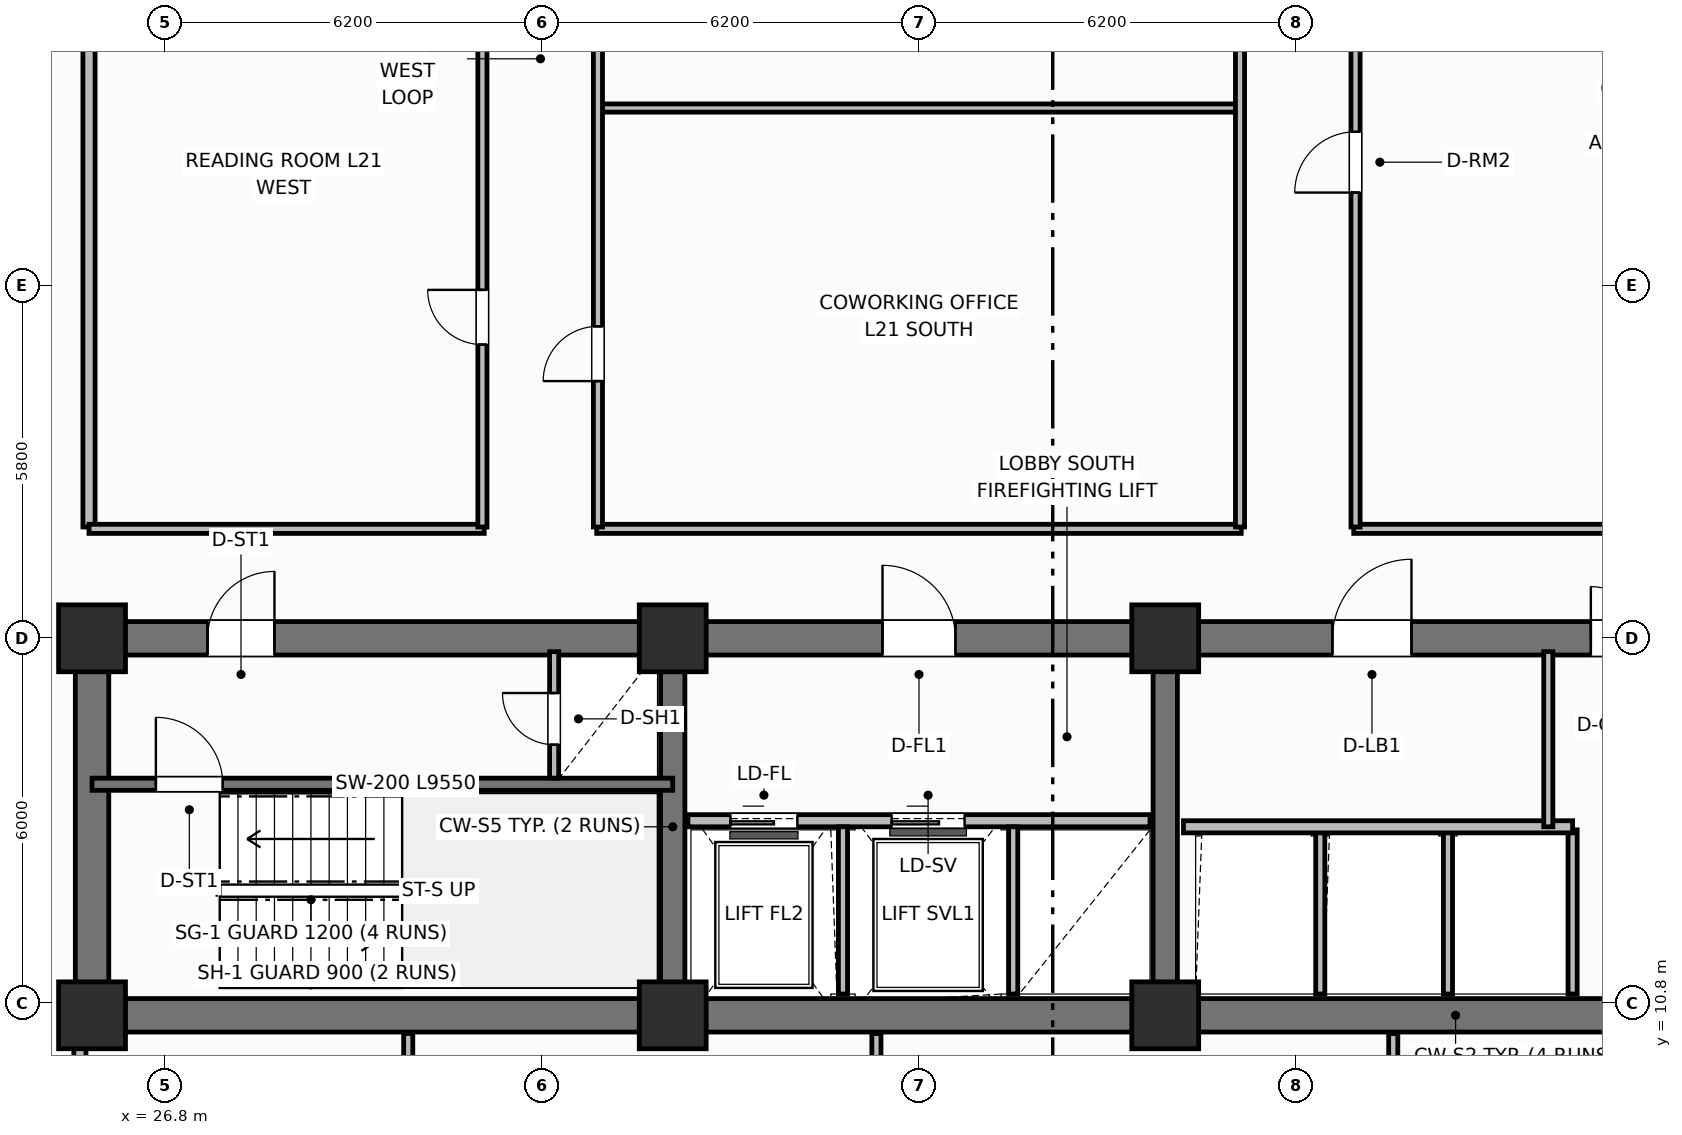
"""IFC4 building model, lengths in metres.
Left out: names, types, materials, properties, quantities, classifications, styles, units other than length and angle.
Written with IfcOpenShell. Run it as: python <this file> out.ifc"""

import sys

from ifc_helpers import new_model, si_unit, direction, frame, frame_2d, origin, origin_2d, place, context, subcontext, project, spatial, rectangle, extrude, element, fill, save


model = new_model("IFC4")
c1 = context("Model", 3, precision=1e-05, world=origin(), true_north=direction((0.0, 1.0)))
c2 = subcontext(c1, "Body", "Model", "MODEL_VIEW")
j1 = project(units=[si_unit("LENGTHUNIT", "METRE"), si_unit("PLANEANGLEUNIT", "RADIAN")], contexts=[c1])
p1 = place(None, origin())
s1 = spatial("IfcSite", under=j1, at=p1, CompositionType="ELEMENT")
p2 = place(p1, origin())
s2 = spatial("IfcBuilding", under=s1, at=p2, CompositionType="ELEMENT")
p3 = place(p2, frame((0.0, 0.0, 88.3)))
s3 = spatial("IfcBuildingStorey", under=s2, at=p3, CompositionType="ELEMENT", Elevation=88.3)
p4 = place(p3, frame((52.8, 10.6, 0.0), z_axis=(0.0, 0.0, 1.0), x_axis=(-1.0, 0.0, 0.0)))
e1 = element("IfcWall", 1, at=p4, inside=s3, PredefinedType="SHEAR", context=c2, shape_type="SweptSolid", body=[
    extrude(rectangle(XDim=27.2, YDim=0.55, at=frame_2d((13.6, 0.0))), origin(), (0.0, 0.0, 1.0), 3.7),
])
p5 = place(p3, frame((25.6, 10.875, 0.0), z_axis=(0.0, 0.0, 1.0), x_axis=(0.0, 1.0, 0.0)))
e2 = element("IfcWall", 2, at=p5, inside=s3, PredefinedType="SHEAR", context=c2, shape_type="SweptSolid", body=[
    extrude(rectangle(XDim=5.65, YDim=0.55, at=frame_2d((2.825, 0.0))), origin(), (0.0, 0.0, 1.0), 3.7),
])
p6 = place(p3, frame((25.6, 16.8, 0.0), z_axis=(0.0, 0.0, 1.0), x_axis=(1.0, 0.0, 0.0)))
e3 = element("IfcWall", 3, at=p6, inside=s3, PredefinedType="SHEAR", context=c2, shape_type="SweptSolid", body=[
    extrude(rectangle(XDim=27.2, YDim=0.55, at=frame_2d((13.6, 0.0))), origin(), (0.0, 0.0, 1.0), 3.7),
])
p7 = place(p6, frame((1.9, 0.0, 0.0)))
e4 = element("IfcOpeningElement", 4, at=p7, cuts=e3, PredefinedType="OPENING", context=c2, shape_type="SweptSolid", body=[
    extrude(rectangle(XDim=1.1, YDim=2.15, at=frame_2d((0.55, 1.075))), frame((0.0, 0.285, 0.0), z_axis=(0.0, -1.0, 0.0), x_axis=(1.0, 0.0, 0.0)), (0.0, 0.0, 1.0), 0.57),
])
p8 = place(p6, frame((13.0, 0.0, 0.0)))
e5 = element("IfcOpeningElement", 5, at=p8, cuts=e3, PredefinedType="OPENING", context=c2, shape_type="SweptSolid", body=[
    extrude(rectangle(XDim=1.2, YDim=2.15, at=frame_2d((0.6, 1.075))), frame((0.0, 0.285, 0.0), z_axis=(0.0, -1.0, 0.0), x_axis=(1.0, 0.0, 0.0)), (0.0, 0.0, 1.0), 0.57),
])
p9 = place(p6, frame((20.4, 0.0, 0.0)))
e6 = element("IfcOpeningElement", 6, at=p9, cuts=e3, PredefinedType="OPENING", context=c2, shape_type="SweptSolid", body=[
    extrude(rectangle(XDim=1.3, YDim=2.2, at=frame_2d((0.65, 1.1))), frame((0.0, 0.285, 0.0), z_axis=(0.0, -1.0, 0.0), x_axis=(1.0, 0.0, 0.0)), (0.0, 0.0, 1.0), 0.57),
])
p10 = place(p6, frame((24.65, 0.0, 0.0)))
e7 = element("IfcOpeningElement", 7, at=p10, cuts=e3, PredefinedType="OPENING", context=c2, shape_type="SweptSolid", body=[
    extrude(rectangle(XDim=0.85, YDim=2.1, at=frame_2d((0.425, 1.05))), frame((0.0, 0.285, 0.0), z_axis=(0.0, -1.0, 0.0), x_axis=(1.0, 0.0, 0.0)), (0.0, 0.0, 1.0), 0.57),
])
for number, where, z_axis, x_axis in (
    (8, (35.15, 10.875, 0.0), (0.0, 0.0, 1.0), (0.0, 1.0, 0.0)),
    (9, (43.25, 10.875, 0.0), (0.0, 0.0, 1.0), (0.0, 1.0, 0.0)),
):
    element("IfcWall", number, at=place(p3, frame(where, z_axis=z_axis, x_axis=x_axis)), inside=s3, PredefinedType="SHEAR", context=c2, shape_type="SweptSolid", body=[
        extrude(rectangle(XDim=5.65, YDim=0.4, at=frame_2d((2.825, 0.0))), origin(), (0.0, 0.0, 1.0), 3.7),
    ])
for number, where, z_axis, x_axis in (
    (10, (25.6, 10.6, 0.0), (0.0, 0.0, 1.0), (1.0, 0.0, 0.0)),
    (11, (25.6, 16.8, 0.0), (0.0, 0.0, 1.0), (1.0, 0.0, 0.0)),
    (12, (35.15, 10.6, 0.0), (0.0, 0.0, 1.0), (1.0, 0.0, 0.0)),
    (13, (35.15, 16.8, 0.0), (0.0, 0.0, 1.0), (1.0, 0.0, 0.0)),
    (14, (43.25, 10.6, 0.0), (0.0, 0.0, 1.0), (1.0, 0.0, 0.0)),
    (15, (43.25, 16.8, 0.0), (0.0, 0.0, 1.0), (1.0, 0.0, 0.0)),
):
    element("IfcColumn", number, at=place(p3, frame(where, z_axis=z_axis, x_axis=x_axis)), inside=s3, PredefinedType="COLUMN", context=c2, shape_type="SweptSolid", body=[
        extrude(rectangle(XDim=1.1, YDim=1.1, at=origin_2d()), origin(), (0.0, 0.0, 1.0), 3.7),
    ])
p11 = place(p3, frame((25.6, 14.4, 0.0), z_axis=(0.0, 0.0, 1.0), x_axis=(1.0, 0.0, 0.0)))
e16 = element("IfcWall", 16, at=p11, inside=s3, PredefinedType="SHEAR", context=c2, shape_type="SweptSolid", body=[
    extrude(rectangle(XDim=9.55, YDim=0.2, at=frame_2d((4.775, 0.0))), origin(), (0.0, 0.0, 1.0), 3.7),
])
p12 = place(p11, frame((1.05, 0.0, 0.0)))
e17 = element("IfcOpeningElement", 17, at=p12, cuts=e16, PredefinedType="OPENING", context=c2, shape_type="SweptSolid", body=[
    extrude(rectangle(XDim=1.1, YDim=2.15, at=frame_2d((0.55, 1.075))), frame((0.0, 0.11, 0.0), z_axis=(0.0, -1.0, 0.0), x_axis=(1.0, 0.0, 0.0)), (0.0, 0.0, 1.0), 0.22),
])
p13 = place(p3, frame((33.2, 14.5, 0.0), z_axis=(0.0, 0.0, 1.0), x_axis=(0.0, 1.0, 0.0)))
e18 = element("IfcWall", 18, at=p13, inside=s3, PredefinedType="PARTITIONING", context=c2, shape_type="SweptSolid", body=[
    extrude(rectangle(XDim=2.08, YDim=0.15, at=frame_2d((1.04, 0.0))), origin(), (0.0, 0.0, 1.0), 2.53),
])
p14 = place(p13, frame((0.55, 0.0, 0.0)))
e19 = element("IfcOpeningElement", 19, at=p14, cuts=e18, PredefinedType="OPENING", context=c2, shape_type="SweptSolid", body=[
    extrude(rectangle(XDim=0.85, YDim=2.05, at=frame_2d((0.425, 1.025))), frame((0.0, 0.085, 0.0), z_axis=(0.0, -1.0, 0.0), x_axis=(1.0, 0.0, 0.0)), (0.0, 0.0, 1.0), 0.17),
])
p15 = place(p3, frame((35.4, 13.8, 0.0), z_axis=(0.0, 0.0, 1.0), x_axis=(1.0, 0.0, 0.0)))
e20 = element("IfcWall", 20, at=p15, inside=s3, PredefinedType="PARTITIONING", context=c2, shape_type="SweptSolid", body=[
    extrude(rectangle(XDim=7.6, YDim=0.2, at=frame_2d((3.8, 0.0))), origin(), (0.0, 0.0, 1.0), 2.3),
])
p16 = place(p15, frame((0.7, 0.0, 0.0)))
e21 = element("IfcOpeningElement", 21, at=p16, cuts=e20, PredefinedType="OPENING", context=c2, shape_type="SweptSolid", body=[
    extrude(rectangle(XDim=1.1, YDim=2.15, at=frame_2d((0.55, 1.075))), frame((0.0, 0.11, 0.0), z_axis=(0.0, -1.0, 0.0), x_axis=(1.0, 0.0, 0.0)), (0.0, 0.0, 1.0), 0.22),
])
p17 = place(p15, frame((3.35, 0.0, 0.0)))
e22 = element("IfcOpeningElement", 22, at=p17, cuts=e20, PredefinedType="OPENING", context=c2, shape_type="SweptSolid", body=[
    extrude(rectangle(XDim=1.2, YDim=2.15, at=frame_2d((0.6, 1.075))), frame((0.0, 0.11, 0.0), z_axis=(0.0, -1.0, 0.0), x_axis=(1.0, 0.0, 0.0)), (0.0, 0.0, 1.0), 0.22),
])
for number, where, z_axis, x_axis in (
    (23, (37.95, 10.95, 0.0), (0.0, 0.0, 1.0), (0.0, 1.0, 0.0)),
    (24, (40.75, 10.95, 0.0), (0.0, 0.0, 1.0), (0.0, 1.0, 0.0)),
):
    element("IfcWall", number, at=place(p3, frame(where, z_axis=z_axis, x_axis=x_axis)), inside=s3, PredefinedType="PARTITIONING", context=c2, shape_type="SweptSolid", body=[
        extrude(rectangle(XDim=2.75, YDim=0.15, at=frame_2d((1.375, 0.0))), origin(), (0.0, 0.0, 1.0), 2.53),
    ])
for number, where, z_axis, x_axis in (
    (25, (45.8, 10.95, 0.0), (0.0, 0.0, 1.0), (0.0, 1.0, 0.0)),
    (26, (47.9, 10.95, 0.0), (0.0, 0.0, 1.0), (0.0, 1.0, 0.0)),
    (27, (49.95, 10.95, 0.0), (0.0, 0.0, 1.0), (0.0, 1.0, 0.0)),
):
    element("IfcWall", number, at=place(p3, frame(where, z_axis=z_axis, x_axis=x_axis)), inside=s3, PredefinedType="PARTITIONING", context=c2, shape_type="SweptSolid", body=[
        extrude(rectangle(XDim=2.7, YDim=0.15, at=frame_2d((1.35, 0.0))), origin(), (0.0, 0.0, 1.0), 2.53),
    ])
p18 = place(p3, frame((43.55, 13.7, 0.0), z_axis=(0.0, 0.0, 1.0), x_axis=(1.0, 0.0, 0.0)))
e28 = element("IfcWall", 28, at=p18, inside=s3, PredefinedType="PARTITIONING", context=c2, shape_type="SweptSolid", body=[
    extrude(rectangle(XDim=6.4, YDim=0.2, at=frame_2d((3.2, 0.0))), origin(), (0.0, 0.0, 1.0), 2.53),
])
p19 = place(p3, frame((49.55, 13.7, 0.0), z_axis=(0.0, 0.0, 1.0), x_axis=(0.0, 1.0, 0.0)))
e29 = element("IfcWall", 29, at=p19, inside=s3, PredefinedType="PARTITIONING", context=c2, shape_type="SweptSolid", body=[
    extrude(rectangle(XDim=2.88, YDim=0.15, at=frame_2d((1.44, 0.0))), origin(), (0.0, 0.0, 1.0), 2.53),
])
p20 = place(p3, frame((25.55, 18.63, 0.0), z_axis=(0.0, 0.0, 1.0), x_axis=(0.0, 1.0, 0.0)))
e30 = element("IfcWall", 30, at=p20, inside=s3, PredefinedType="PARTITIONING", context=c2, shape_type="SweptSolid", body=[
    extrude(rectangle(XDim=19.14, YDim=0.2, at=frame_2d((9.57, 0.0))), origin(), (0.0, 0.0, 1.0), 2.53),
])
p21 = place(p3, frame((25.55, 18.6, 0.0), z_axis=(0.0, 0.0, 1.0), x_axis=(1.0, 0.0, 0.0)))
e31 = element("IfcWall", 31, at=p21, inside=s3, PredefinedType="PARTITIONING", context=c2, shape_type="SweptSolid", body=[
    extrude(rectangle(XDim=6.5, YDim=0.15, at=frame_2d((3.25, 0.0))), origin(), (0.0, 0.0, 1.0), 2.53),
])
p22 = place(p3, frame((33.9, 18.6, 0.0), z_axis=(0.0, 0.0, 1.0), x_axis=(1.0, 0.0, 0.0)))
e32 = element("IfcWall", 32, at=p22, inside=s3, PredefinedType="PARTITIONING", context=c2, shape_type="SweptSolid", body=[
    extrude(rectangle(XDim=10.6, YDim=0.15, at=frame_2d((5.3, 0.0))), origin(), (0.0, 0.0, 1.0), 2.53),
])
p23 = place(p3, frame((46.35, 18.6, 0.0), z_axis=(0.0, 0.0, 1.0), x_axis=(1.0, 0.0, 0.0)))
e33 = element("IfcWall", 33, at=p23, inside=s3, PredefinedType="PARTITIONING", context=c2, shape_type="SweptSolid", body=[
    extrude(rectangle(XDim=6.5, YDim=0.15, at=frame_2d((3.25, 0.0))), origin(), (0.0, 0.0, 1.0), 2.53),
])
p24 = place(p3, frame((33.92, 25.521, 0.0), z_axis=(0.0, 0.0, 1.0), x_axis=(1.0, 0.0, 0.0)))
e34 = element("IfcWall", 34, at=p24, inside=s3, PredefinedType="PARTITIONING", context=c2, shape_type="SweptSolid", body=[
    extrude(rectangle(XDim=10.56, YDim=0.135, at=frame_2d((5.28, 0.0))), origin(), (0.0, 0.0, 1.0), 2.53),
])
p25 = place(p3, frame((32.02, 18.63, 0.0), z_axis=(0.0, 0.0, 1.0), x_axis=(0.0, 1.0, 0.0)))
e35 = element("IfcWall", 35, at=p25, inside=s3, PredefinedType="PARTITIONING", context=c2, shape_type="SweptSolid", body=[
    extrude(rectangle(XDim=19.14, YDim=0.15, at=frame_2d((9.57, 0.0))), origin(), (0.0, 0.0, 1.0), 2.53),
])
p26 = place(p25, frame((3.0, 0.0, 0.0)))
e36 = element("IfcOpeningElement", 36, at=p26, cuts=e35, PredefinedType="OPENING", context=c2, shape_type="SweptSolid", body=[
    extrude(rectangle(XDim=0.9, YDim=2.1, at=frame_2d((0.45, 1.05))), frame((0.0, 0.085, 0.0), z_axis=(0.0, -1.0, 0.0), x_axis=(1.0, 0.0, 0.0)), (0.0, 0.0, 1.0), 0.17),
])
p27 = place(p25, frame((11.5, 0.0, 0.0)))
e37 = element("IfcOpeningElement", 37, at=p27, cuts=e35, PredefinedType="OPENING", context=c2, shape_type="SweptSolid", body=[
    extrude(rectangle(XDim=0.9, YDim=2.1, at=frame_2d((0.45, 1.05))), frame((0.0, 0.085, 0.0), z_axis=(0.0, -1.0, 0.0), x_axis=(1.0, 0.0, 0.0)), (0.0, 0.0, 1.0), 0.17),
])
p28 = place(p3, frame((33.92, 18.63, 0.0), z_axis=(0.0, 0.0, 1.0), x_axis=(0.0, 1.0, 0.0)))
e38 = element("IfcWall", 38, at=p28, inside=s3, PredefinedType="PARTITIONING", context=c2, shape_type="SweptSolid", body=[
    extrude(rectangle(XDim=19.14, YDim=0.15, at=frame_2d((9.57, 0.0))), origin(), (0.0, 0.0, 1.0), 2.53),
])
p29 = place(p28, frame((2.4, 0.0, 0.0)))
e39 = element("IfcOpeningElement", 39, at=p29, cuts=e38, PredefinedType="OPENING", context=c2, shape_type="SweptSolid", body=[
    extrude(rectangle(XDim=0.9, YDim=2.1, at=frame_2d((0.45, 1.05))), frame((0.0, 0.085, 0.0), z_axis=(0.0, -1.0, 0.0), x_axis=(1.0, 0.0, 0.0)), (0.0, 0.0, 1.0), 0.17),
])
p30 = place(p3, frame((44.48, 18.63, 0.0), z_axis=(0.0, 0.0, 1.0), x_axis=(0.0, 1.0, 0.0)))
e40 = element("IfcWall", 40, at=p30, inside=s3, PredefinedType="PARTITIONING", context=c2, shape_type="SweptSolid", body=[
    extrude(rectangle(XDim=19.14, YDim=0.15, at=frame_2d((9.57, 0.0))), origin(), (0.0, 0.0, 1.0), 2.53),
])
p31 = place(p30, frame((8.89, 0.0, 0.0)))
e41 = element("IfcOpeningElement", 41, at=p31, cuts=e40, PredefinedType="OPENING", context=c2, shape_type="SweptSolid", body=[
    extrude(rectangle(XDim=0.9, YDim=2.1, at=frame_2d((0.45, 1.05))), frame((0.0, 0.085, 0.0), z_axis=(0.0, -1.0, 0.0), x_axis=(1.0, 0.0, 0.0)), (0.0, 0.0, 1.0), 0.17),
])
p32 = place(p3, frame((46.38, 18.63, 0.0), z_axis=(0.0, 0.0, 1.0), x_axis=(0.0, 1.0, 0.0)))
e42 = element("IfcWall", 42, at=p32, inside=s3, PredefinedType="PARTITIONING", context=c2, shape_type="SweptSolid", body=[
    extrude(rectangle(XDim=19.14, YDim=0.15, at=frame_2d((9.57, 0.0))), origin(), (0.0, 0.0, 1.0), 2.53),
])
p33 = place(p32, frame((5.5, 0.0, 0.0)))
e43 = element("IfcOpeningElement", 43, at=p33, cuts=e42, PredefinedType="OPENING", context=c2, shape_type="SweptSolid", body=[
    extrude(rectangle(XDim=1.0, YDim=2.15, at=frame_2d((0.5, 1.075))), frame((0.0, 0.085, 0.0), z_axis=(0.0, -1.0, 0.0), x_axis=(1.0, 0.0, 0.0)), (0.0, 0.0, 1.0), 0.17),
])
p34 = place(p3, frame((30.8, 4.97, 0.0), z_axis=(0.0, 0.0, 1.0), x_axis=(0.0, 1.0, 0.0)))
e44 = element("IfcWall", 44, at=p34, inside=s3, PredefinedType="PARTITIONING", context=c2, shape_type="SweptSolid", body=[
    extrude(rectangle(XDim=5.33, YDim=0.15, at=frame_2d((2.665, 0.0))), origin(), (0.0, 0.0, 1.0), 2.53),
])
p35 = place(p34, frame((1.3, 0.0, 0.0)))
e45 = element("IfcOpeningElement", 45, at=p35, cuts=e44, PredefinedType="OPENING", context=c2, shape_type="SweptSolid", body=[
    extrude(rectangle(XDim=0.9, YDim=2.1, at=frame_2d((0.45, 1.05))), frame((0.0, 0.085, 0.0), z_axis=(0.0, -1.0, 0.0), x_axis=(1.0, 0.0, 0.0)), (0.0, 0.0, 1.0), 0.17),
])
p36 = place(p3, frame((38.5, 4.97, 0.0), z_axis=(0.0, 0.0, 1.0), x_axis=(0.0, 1.0, 0.0)))
e46 = element("IfcWall", 46, at=p36, inside=s3, PredefinedType="PARTITIONING", context=c2, shape_type="SweptSolid", body=[
    extrude(rectangle(XDim=5.33, YDim=0.15, at=frame_2d((2.665, 0.0))), origin(), (0.0, 0.0, 1.0), 2.53),
])
p37 = place(p3, frame((47.0, 4.97, 0.0), z_axis=(0.0, 0.0, 1.0), x_axis=(0.0, 1.0, 0.0)))
e47 = element("IfcWall", 47, at=p37, inside=s3, PredefinedType="PARTITIONING", context=c2, shape_type="SweptSolid", body=[
    extrude(rectangle(XDim=5.33, YDim=0.15, at=frame_2d((2.665, 0.0))), origin(), (0.0, 0.0, 1.0), 2.53),
])
p38 = place(p37, frame((1.3, 0.0, 0.0)))
e48 = element("IfcOpeningElement", 48, at=p38, cuts=e47, PredefinedType="OPENING", context=c2, shape_type="SweptSolid", body=[
    extrude(rectangle(XDim=0.9, YDim=2.1, at=frame_2d((0.45, 1.05))), frame((0.0, 0.085, 0.0), z_axis=(0.0, -1.0, 0.0), x_axis=(1.0, 0.0, 0.0)), (0.0, 0.0, 1.0), 0.17),
])
p39 = place(p3, frame((25.4, 5.62, 0.0), z_axis=(0.0, 0.0, 1.0), x_axis=(0.0, 1.0, 0.0)))
e49 = element("IfcWall", 49, at=p39, inside=s3, PredefinedType="PARTITIONING", context=c2, shape_type="SweptSolid", body=[
    extrude(rectangle(XDim=4.68, YDim=0.2, at=frame_2d((2.34, 0.0))), origin(), (0.0, 0.0, 1.0), 2.53),
])
p40 = place(p39, frame((1.3, 0.0, 0.0)))
e50 = element("IfcOpeningElement", 50, at=p40, cuts=e49, PredefinedType="OPENING", context=c2, shape_type="SweptSolid", body=[
    extrude(rectangle(XDim=0.9, YDim=2.1, at=frame_2d((0.45, 1.05))), frame((0.0, 0.11, 0.0), z_axis=(0.0, -1.0, 0.0), x_axis=(1.0, 0.0, 0.0)), (0.0, 0.0, 1.0), 0.22),
])
p41 = place(p12, origin())
e51 = element("IfcDoor", 51, at=p41, inside=s3, OperationType="SINGLE_SWING_LEFT", PredefinedType="DOOR", context=c2, shape_type="SweptSolid", body=[
    extrude(rectangle(XDim=1.1, YDim=2.15, at=frame_2d((0.55, 1.075))), frame((0.0, 0.025, 0.0), z_axis=(0.0, -1.0, 0.0), x_axis=(1.0, 0.0, 0.0)), (0.0, 0.0, 1.0), 0.05),
])
fill(e17, e51)
p42 = place(p14, origin())
e52 = element("IfcDoor", 52, at=p42, inside=s3, OperationType="SINGLE_SWING_RIGHT", PredefinedType="TRAPDOOR", context=c2, shape_type="SweptSolid", body=[
    extrude(rectangle(XDim=0.85, YDim=2.05, at=frame_2d((0.425, 1.025))), frame((0.0, 0.025, 0.0), z_axis=(0.0, -1.0, 0.0), x_axis=(1.0, 0.0, 0.0)), (0.0, 0.0, 1.0), 0.05),
])
fill(e19, e52)
p43 = place(p16, origin())
e53 = element("IfcDoor", 53, at=p43, inside=s3, OperationType="SLIDING_TO_LEFT", PredefinedType="DOOR", context=c2, shape_type="SweptSolid", body=[
    extrude(rectangle(XDim=1.1, YDim=2.15, at=frame_2d((0.55, 1.075))), frame((0.0, 0.025, 0.0), z_axis=(0.0, -1.0, 0.0), x_axis=(1.0, 0.0, 0.0)), (0.0, 0.0, 1.0), 0.05),
])
fill(e21, e53)
p44 = place(p17, origin())
e54 = element("IfcDoor", 54, at=p44, inside=s3, OperationType="SLIDING_TO_LEFT", PredefinedType="DOOR", context=c2, shape_type="SweptSolid", body=[
    extrude(rectangle(XDim=1.2, YDim=2.15, at=frame_2d((0.6, 1.075))), frame((0.0, 0.025, 0.0), z_axis=(0.0, -1.0, 0.0), x_axis=(1.0, 0.0, 0.0)), (0.0, 0.0, 1.0), 0.05),
])
fill(e22, e54)
p45 = place(p26, origin())
e55 = element("IfcDoor", 55, at=p45, inside=s3, OperationType="SINGLE_SWING_RIGHT", PredefinedType="DOOR", context=c2, shape_type="SweptSolid", body=[
    extrude(rectangle(XDim=0.9, YDim=2.1, at=frame_2d((0.45, 1.05))), frame((0.0, 0.025, 0.0), z_axis=(0.0, -1.0, 0.0), x_axis=(1.0, 0.0, 0.0)), (0.0, 0.0, 1.0), 0.05),
])
fill(e36, e55)
p46 = place(p29, origin())
e56 = element("IfcDoor", 56, at=p46, inside=s3, OperationType="SINGLE_SWING_LEFT", PredefinedType="DOOR", context=c2, shape_type="SweptSolid", body=[
    extrude(rectangle(XDim=0.9, YDim=2.1, at=frame_2d((0.45, 1.05))), frame((0.0, 0.025, 0.0), z_axis=(0.0, -1.0, 0.0), x_axis=(1.0, 0.0, 0.0)), (0.0, 0.0, 1.0), 0.05),
])
fill(e39, e56)
p47 = place(p33, origin())
e57 = element("IfcDoor", 57, at=p47, inside=s3, OperationType="SINGLE_SWING_LEFT", PredefinedType="DOOR", context=c2, shape_type="SweptSolid", body=[
    extrude(rectangle(XDim=1.0, YDim=2.15, at=frame_2d((0.5, 1.075))), frame((0.0, 0.025, 0.0), z_axis=(0.0, -1.0, 0.0), x_axis=(1.0, 0.0, 0.0)), (0.0, 0.0, 1.0), 0.05),
])
fill(e43, e57)
p48 = place(p7, origin())
e58 = element("IfcDoor", 58, at=p48, inside=s3, OperationType="SINGLE_SWING_RIGHT", PredefinedType="DOOR", context=c2, shape_type="SweptSolid", body=[
    extrude(rectangle(XDim=1.1, YDim=2.15, at=frame_2d((0.55, 1.075))), frame((0.0, 0.025, 0.0), z_axis=(0.0, -1.0, 0.0), x_axis=(1.0, 0.0, 0.0)), (0.0, 0.0, 1.0), 0.05),
])
fill(e4, e58)
p49 = place(p8, origin())
e59 = element("IfcDoor", 59, at=p49, inside=s3, OperationType="SINGLE_SWING_LEFT", PredefinedType="DOOR", context=c2, shape_type="SweptSolid", body=[
    extrude(rectangle(XDim=1.2, YDim=2.15, at=frame_2d((0.6, 1.075))), frame((0.0, 0.025, 0.0), z_axis=(0.0, -1.0, 0.0), x_axis=(1.0, 0.0, 0.0)), (0.0, 0.0, 1.0), 0.05),
])
fill(e5, e59)
p50 = place(p9, origin())
e60 = element("IfcDoor", 60, at=p50, inside=s3, OperationType="SINGLE_SWING_RIGHT", PredefinedType="DOOR", context=c2, shape_type="SweptSolid", body=[
    extrude(rectangle(XDim=1.3, YDim=2.2, at=frame_2d((0.65, 1.1))), frame((0.0, 0.025, 0.0), z_axis=(0.0, -1.0, 0.0), x_axis=(1.0, 0.0, 0.0)), (0.0, 0.0, 1.0), 0.05),
])
fill(e6, e60)
p51 = place(p10, origin())
e61 = element("IfcDoor", 61, at=p51, inside=s3, OperationType="SINGLE_SWING_LEFT", PredefinedType="DOOR", context=c2, shape_type="SweptSolid", body=[
    extrude(rectangle(XDim=0.85, YDim=2.1, at=frame_2d((0.425, 1.05))), frame((0.0, 0.025, 0.0), z_axis=(0.0, -1.0, 0.0), x_axis=(1.0, 0.0, 0.0)), (0.0, 0.0, 1.0), 0.05),
])
fill(e7, e61)
save(model, sys.argv[1])
